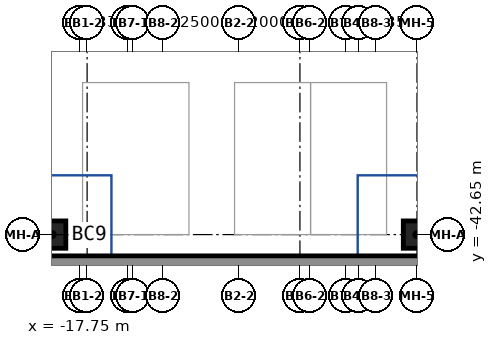
"""IFC4 building model, lengths in metres.
Left out: names, types, materials, properties, quantities, classifications, styles, units other than length and angle.
Written with IfcOpenShell. Run it as: python <this file> out.ifc"""

import sys

from ifc_helpers import new_model, si_unit, direction, frame, frame_2d, origin, origin_2d, place, context, subcontext, project, spatial, rectangle, extrude, source, transform, mapped, element, save


model = new_model("IFC4")
c1 = context("Model", 3, precision=1e-05, world=origin(), true_north=direction((0.0, 1.0)))
c2 = subcontext(c1, "Body", "Model", "MODEL_VIEW")
j1 = project(units=[si_unit("LENGTHUNIT", "METRE"), si_unit("PLANEANGLEUNIT", "RADIAN")], contexts=[c1])
p1 = place(None, origin())
s1 = spatial("IfcSite", under=j1, at=p1, CompositionType="ELEMENT")
p2 = place(p1, origin())
s2 = spatial("IfcBuilding", under=s1, at=p2, CompositionType="ELEMENT")
p3 = place(p2, frame((0.0, 0.0, -9.0)))
s3 = spatial("IfcBuildingStorey", under=s2, at=p3, CompositionType="ELEMENT", Elevation=-9.0)
m1 = source(origin(), c2, "Body", "SweptSolid", [
    extrude(rectangle(XDim=0.9, YDim=0.9, at=origin_2d()), origin(), (0.0, 0.0, 1.0), 4.5),
])
for number, where, z_axis, x_axis in (
    (1, (-18.65, -42.65, 0.0), (0.0, 0.0, 1.0), (1.0, 0.0, 0.0)),
    (2, (-6.65, -42.65, 0.0), (0.0, 0.0, 1.0), (1.0, 0.0, 0.0)),
):
    element("IfcColumn", number, at=place(p3, frame(where, z_axis=z_axis, x_axis=x_axis)), inside=s3, PredefinedType="COLUMN", context=c2, shape_type="MappedRepresentation", body=[
        mapped(m1, transform((0.0, 0.0, 0.0))),
    ])
m2 = source(origin(), c2, "Body", "SweptSolid", [
    extrude(rectangle(XDim=113.0, YDim=0.5, at=frame_2d((56.5, 0.0))), origin(), (0.0, 0.0, 1.0), 4.9),
])
p4 = place(p3, frame((-57.15, -43.6, -0.4), z_axis=(0.0, 0.0, 1.0), x_axis=(1.0, 0.0, 0.0)))
e3 = element("IfcWall", 3, at=p4, inside=s3, PredefinedType="SOLIDWALL", context=c2, shape_type="MappedRepresentation", body=[
    mapped(m2, transform((0.0, 0.0, 0.0))),
])
save(model, sys.argv[1])
